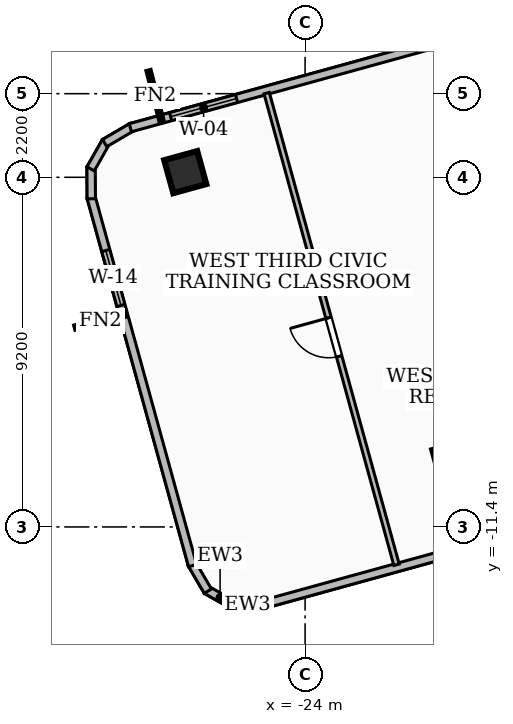
"""IFC4 building model, lengths in metres.
Left out: names, types, materials, properties, quantities, classifications, styles, units other than length and angle.
Written with IfcOpenShell. Run it as: python <this file> out.ifc"""

import sys

from ifc_helpers import new_model, si_unit, direction, frame, frame_2d, origin, origin_2d, place, context, subcontext, project, spatial, rectangle, extrude, element, fill, save


model = new_model("IFC4")
c1 = context("Model", 3, precision=1e-05, world=origin(), true_north=direction((0.0, 1.0)))
c2 = subcontext(c1, "Body", "Model", "MODEL_VIEW")
j1 = project(units=[si_unit("LENGTHUNIT", "METRE"), si_unit("PLANEANGLEUNIT", "RADIAN")], contexts=[c1])
p1 = place(None, origin())
s1 = spatial("IfcSite", under=j1, at=p1, CompositionType="ELEMENT")
p2 = place(p1, origin())
s2 = spatial("IfcBuilding", under=s1, at=p2, CompositionType="ELEMENT")
p3 = place(p2, frame((0.0, 0.0, 137.88)))
s3 = spatial("IfcBuildingStorey", under=s2, at=p3, CompositionType="ELEMENT", Elevation=137.88)
for number, where, z_axis, x_axis in (
    (1, (-27.153, -2.064, 0.0), (0.0, 0.0, 1.0), (0.964, 0.266, 0.0)),
    (2, (-20.098, -9.692, 0.0), (0.0, 0.0, 1.0), (0.964, 0.266, 0.0)),
):
    element("IfcColumn", number, at=place(p3, frame(where, z_axis=z_axis, x_axis=x_axis)), inside=s3, PredefinedType="COLUMN", context=c2, shape_type="SweptSolid", body=[
        extrude(rectangle(XDim=0.9, YDim=0.9, at=origin_2d()), origin(), (0.0, 0.0, 1.0), 3.6),
    ])
p4 = place(p3, frame((-12.166, -9.876, 0.0), z_axis=(0.0, 0.0, 1.0), x_axis=(-0.964099811745, -0.2655401156, 0.0)))
e3 = element("IfcWall", 3, at=p4, inside=s3, PredefinedType="SOLIDWALL", context=c2, shape_type="SweptSolid", body=[
    extrude(rectangle(XDim=13.459, YDim=0.22, at=frame_2d((6.729, 0.0))), origin(), (0.0, 0.0, 1.0), 2.624),
])
p5 = place(p3, frame((-25.093, -13.443, 0.0), z_axis=(0.0, 0.0, 1.0), x_axis=(-0.999982861094, -0.005854700592, 0.0)))
e4 = element("IfcWall", 4, at=p5, inside=s3, PredefinedType="SOLIDWALL", context=c2, shape_type="SweptSolid", body=[
    extrude(rectangle(XDim=0.834, YDim=0.22, at=frame_2d((0.417, 0.0))), origin(), (0.0, 0.0, 1.0), 3.32),
])
p6 = place(p3, frame((-25.88, -13.46, 0.0), z_axis=(0.0, 0.0, 1.0), x_axis=(-0.87005199541, 0.492959963164, 0.0)))
e5 = element("IfcWall", 5, at=p6, inside=s3, PredefinedType="SOLIDWALL", context=c2, shape_type="SweptSolid", body=[
    extrude(rectangle(XDim=0.82, YDim=0.22, at=frame_2d((0.41, 0.0))), origin(), (0.0, 0.0, 1.0), 3.32),
])
p7 = place(p3, frame((-26.558, -13.09, 0.0), z_axis=(0.0, 0.0, 1.0), x_axis=(-0.506432207312, 0.862279780232, 0.0)))
e6 = element("IfcWall", 6, at=p7, inside=s3, PredefinedType="SOLIDWALL", context=c2, shape_type="SweptSolid", body=[
    extrude(rectangle(XDim=0.835, YDim=0.22, at=frame_2d((0.417, 0.0))), origin(), (0.0, 0.0, 1.0), 3.32),
])
p8 = place(p3, frame((-26.961, -12.416, 0.0), z_axis=(0.0, 0.0, 1.0), x_axis=(-0.265584520086, 0.964087580405, 0.0)))
e7 = element("IfcWall", 7, at=p8, inside=s3, PredefinedType="SOLIDWALL", context=c2, shape_type="SweptSolid", body=[
    extrude(rectangle(XDim=10.061, YDim=0.22, at=frame_2d((5.031, 0.0))), origin(), (0.0, 0.0, 1.0), 3.32),
])
p9 = place(p8, frame((7.098, 0.0, 0.85)))
e8 = element("IfcOpeningElement", 8, at=p9, cuts=e7, PredefinedType="OPENING", context=c2, shape_type="SweptSolid", body=[
    extrude(rectangle(XDim=1.5, YDim=1.5, at=frame_2d((0.75, 0.75))), frame((0.0, 0.12, 0.0), z_axis=(0.0, -1.0, 0.0), x_axis=(1.0, 0.0, 0.0)), (0.0, 0.0, 1.0), 0.24),
])
p10 = place(p3, frame((-29.626, -2.765, 0.0), z_axis=(0.0, 0.0, 1.0), x_axis=(-0.006147424822, 0.999981104406, 0.0)))
e9 = element("IfcWall", 9, at=p10, inside=s3, PredefinedType="SOLIDWALL", context=c2, shape_type="SweptSolid", body=[
    extrude(rectangle(XDim=0.834, YDim=0.22, at=frame_2d((0.417, 0.0))), origin(), (0.0, 0.0, 1.0), 3.32),
])
p11 = place(p3, frame((-29.643, -1.978, 0.0), z_axis=(0.0, 0.0, 1.0), x_axis=(0.492057256668, 0.87056283872, 0.0)))
e10 = element("IfcWall", 10, at=p11, inside=s3, PredefinedType="SOLIDWALL", context=c2, shape_type="SweptSolid", body=[
    extrude(rectangle(XDim=0.819, YDim=0.22, at=frame_2d((0.41, 0.0))), origin(), (0.0, 0.0, 1.0), 3.32),
])
p12 = place(p3, frame((-29.274, -1.3, 0.0), z_axis=(0.0, 0.0, 1.0), x_axis=(0.862451814289, 0.506139178517, 0.0)))
e11 = element("IfcWall", 11, at=p12, inside=s3, PredefinedType="SOLIDWALL", context=c2, shape_type="SweptSolid", body=[
    extrude(rectangle(XDim=0.836, YDim=0.22, at=frame_2d((0.418, 0.0))), origin(), (0.0, 0.0, 1.0), 3.32),
])
p13 = place(p3, frame((-28.599, -0.897, 0.0), z_axis=(0.0, 0.0, 1.0), x_axis=(0.964113270695, 0.265491245185, 0.0)))
e12 = element("IfcWall", 12, at=p13, inside=s3, PredefinedType="SOLIDWALL", context=c2, shape_type="SweptSolid", body=[
    extrude(rectangle(XDim=13.458, YDim=0.22, at=frame_2d((6.729, 0.0))), origin(), (0.0, 0.0, 1.0), 3.32),
])
p14 = place(p13, frame((1.1, 0.0, 0.85)))
e13 = element("IfcOpeningElement", 13, at=p14, cuts=e12, PredefinedType="OPENING", context=c2, shape_type="SweptSolid", body=[
    extrude(rectangle(XDim=1.8, YDim=2.0, at=frame_2d((0.9, 1.0))), frame((0.0, 0.12, 0.0), z_axis=(0.0, -1.0, 0.0), x_axis=(1.0, 0.0, 0.0)), (0.0, 0.0, 1.0), 0.24),
])
p15 = place(p3, frame((-21.594, -12.395, 0.0), z_axis=(0.0, 0.0, 1.0), x_axis=(-0.265484036431, 0.964115255766, 0.0)))
e14 = element("IfcWall", 14, at=p15, inside=s3, PredefinedType="PARTITIONING", context=c2, shape_type="SweptSolid", body=[
    extrude(rectangle(XDim=12.871, YDim=0.145, at=frame_2d((6.436, 0.0))), origin(), (0.0, 0.0, 1.0), 2.55),
])
p16 = place(p15, frame((5.689, 0.0, 0.0)))
e15 = element("IfcOpeningElement", 15, at=p16, cuts=e14, PredefinedType="OPENING", context=c2, shape_type="SweptSolid", body=[
    extrude(rectangle(XDim=1.05, YDim=2.08, at=frame_2d((0.525, 1.04))), frame((0.0, 0.083, 0.0), z_axis=(0.0, -1.0, 0.0), x_axis=(1.0, 0.0, 0.0)), (0.0, 0.0, 1.0), 0.165),
])
p17 = place(p9, origin())
e16 = element("IfcWindow", 16, at=p17, inside=s3, PartitioningType="SINGLE_PANEL", PredefinedType="WINDOW", context=c2, shape_type="SweptSolid", body=[
    extrude(rectangle(XDim=1.5, YDim=1.5, at=frame_2d((0.75, 0.75))), frame((0.0, 0.03, 0.0), z_axis=(0.0, -1.0, 0.0), x_axis=(1.0, 0.0, 0.0)), (0.0, 0.0, 1.0), 0.06),
])
fill(e8, e16)
p18 = place(p14, origin())
e17 = element("IfcWindow", 17, at=p18, inside=s3, PartitioningType="SINGLE_PANEL", PredefinedType="WINDOW", context=c2, shape_type="SweptSolid", body=[
    extrude(rectangle(XDim=1.8, YDim=2.0, at=frame_2d((0.9, 1.0))), frame((0.0, 0.03, 0.0), z_axis=(0.0, -1.0, 0.0), x_axis=(1.0, 0.0, 0.0)), (0.0, 0.0, 1.0), 0.06),
])
fill(e13, e17)
p19 = place(p16, origin())
e18 = element("IfcDoor", 18, at=p19, inside=s3, OperationType="SINGLE_SWING_RIGHT", PredefinedType="DOOR", context=c2, shape_type="SweptSolid", body=[
    extrude(rectangle(XDim=1.05, YDim=2.08, at=frame_2d((0.525, 1.04))), frame((0.0, 0.025, 0.0), z_axis=(0.0, -1.0, 0.0), x_axis=(1.0, 0.0, 0.0)), (0.0, 0.0, 1.0), 0.05),
])
fill(e15, e18)
save(model, sys.argv[1])
